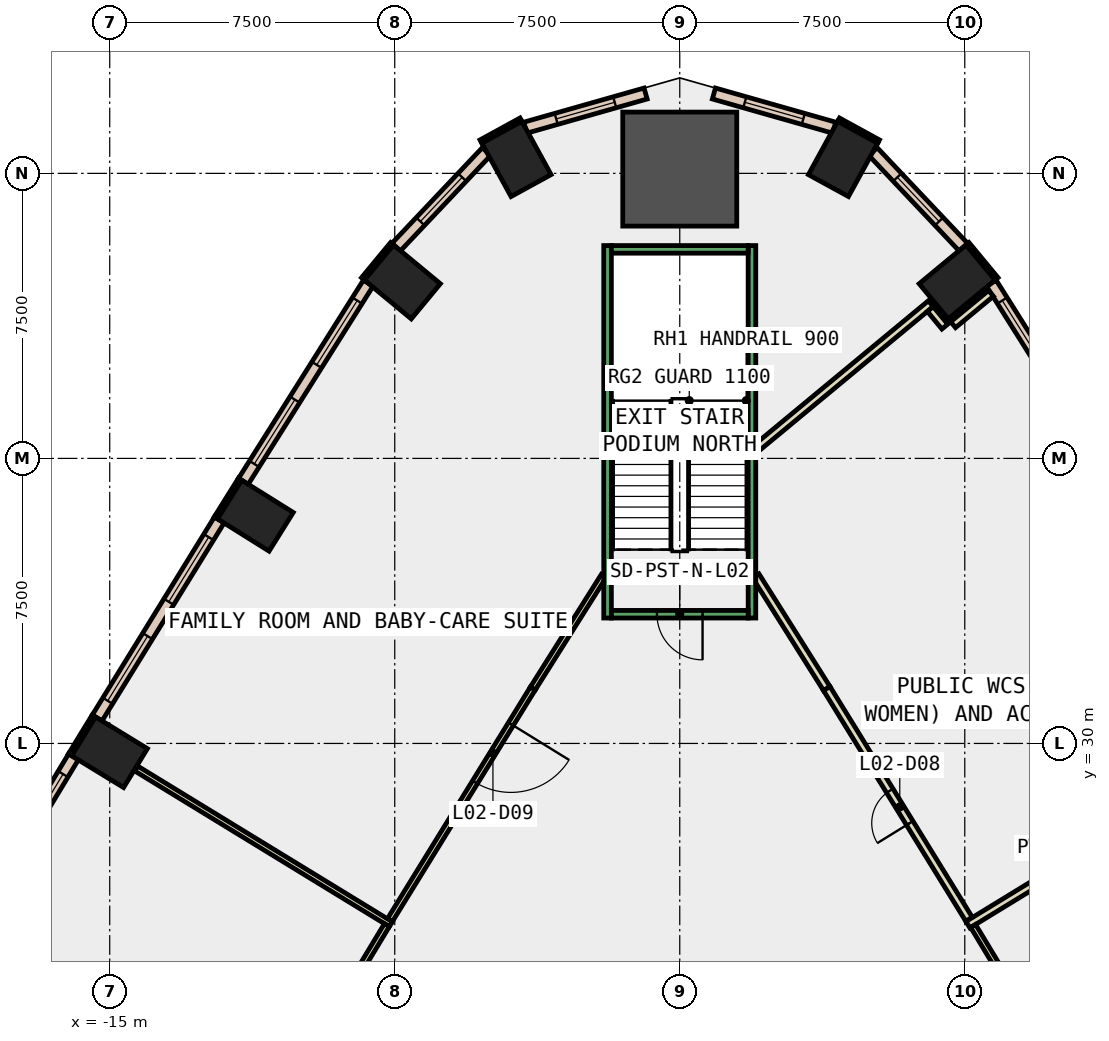
"""IFC4 building model, lengths in metres.
Left out: names, types, materials, properties, quantities, classifications, styles, units other than length and angle.
Written with IfcOpenShell. Run it as: python <this file> out.ifc"""

import sys

from ifc_helpers import new_model, si_unit, direction, frame, frame_2d, origin, origin_2d, place, context, subcontext, project, spatial, rectangle, extrude, element, fill, save


model = new_model("IFC4")
c1 = context("Model", 3, precision=1e-05, world=origin(), true_north=direction((0.0, 1.0)))
c2 = subcontext(c1, "Body", "Model", "MODEL_VIEW")
j1 = project(units=[si_unit("LENGTHUNIT", "METRE"), si_unit("PLANEANGLEUNIT", "RADIAN")], contexts=[c1])
p1 = place(None, origin())
s1 = spatial("IfcSite", under=j1, at=p1, CompositionType="ELEMENT")
p2 = place(p1, origin())
s2 = spatial("IfcBuilding", under=s1, at=p2, CompositionType="ELEMENT")
p3 = place(p2, frame((0.0, 0.0, 15.0)))
s3 = spatial("IfcBuildingStorey", under=s2, at=p3, CompositionType="ELEMENT", Elevation=15.0)
for number, where, z_axis, x_axis in (
    (1, (7.299, 42.144, -0.45), (0.0, 0.0, 1.0), (-0.638, 0.77, 0.0)),
    (2, (4.297, 45.38, -0.45), (0.0, 0.0, 1.0), (-0.877, 0.48, 0.0)),
):
    element("IfcColumn", number, at=place(p3, frame(where, z_axis=z_axis, x_axis=x_axis)), inside=s3, PredefinedType="COLUMN", context=c2, shape_type="SweptSolid", body=[
        extrude(rectangle(XDim=1.2, YDim=1.6, at=origin_2d()), origin(), (0.0, 0.0, 1.0), 5.0),
    ])
p4 = place(p3, frame((0.0, 45.112, -0.45), z_axis=(0.0, 0.0, 1.0), x_axis=(0.0, 1.0, 0.0)))
e3 = element("IfcColumn", 3, at=p4, inside=s3, PredefinedType="COLUMN", context=c2, shape_type="SweptSolid", body=[
    extrude(rectangle(XDim=3.0, YDim=3.0, at=origin_2d()), origin(), (0.0, 0.0, 1.0), 5.0),
])
for number, where, z_axis, x_axis in (
    (4, (-4.297, 45.38, -0.45), (0.0, 0.0, 1.0), (0.877, 0.48, 0.0)),
    (5, (-7.299, 42.144, -0.45), (0.0, 0.0, 1.0), (0.638, 0.77, 0.0)),
    (6, (-11.167, 35.993, -0.45), (0.0, 0.0, 1.0), (0.53, 0.848, 0.0)),
    (7, (-15.005, 29.769, -0.45), (0.0, 0.0, 1.0), (0.522, 0.853, 0.0)),
):
    element("IfcColumn", number, at=place(p3, frame(where, z_axis=z_axis, x_axis=x_axis)), inside=s3, PredefinedType="COLUMN", context=c2, shape_type="SweptSolid", body=[
        extrude(rectangle(XDim=1.2, YDim=1.6, at=origin_2d()), origin(), (0.0, 0.0, 1.0), 5.0),
    ])
for number, where, z_axis, x_axis in (
    (8, (5.231, 45.837, 0.0), (0.0, 0.0, 1.0), (-0.877, 0.48, 0.0)),
    (9, (-4.179, 46.413, 0.0), (0.0, 0.0, 1.0), (-0.877, -0.48, 0.0)),
    (10, (8.336, 42.224, 0.0), (0.0, 0.0, 1.0), (-0.638, 0.77, 0.0)),
    (11, (-7.571, 43.148, 0.0), (0.0, 0.0, 1.0), (-0.638, -0.77, 0.0)),
    (12, (-11.57, 36.952, 0.0), (0.0, 0.0, 1.0), (-0.53, -0.848, 0.0)),
):
    element("IfcWall", number, at=place(p3, frame(where, z_axis=z_axis, x_axis=x_axis)), inside=s3, PredefinedType="STANDARD", context=c2, shape_type="SweptSolid", body=[
        extrude(rectangle(XDim=1.199, YDim=0.1, at=frame_2d((0.6, 0.0))), origin(), (0.0, 0.0, 1.0), 4.55),
    ])
p5 = place(p3, frame((-15.417, 30.724, 0.0), z_axis=(0.0, 0.0, 1.0), x_axis=(-0.521507599072, -0.853246637327, 0.0)))
e13 = element("IfcWall", 13, at=p5, inside=s3, PredefinedType="STANDARD", context=c2, shape_type="SweptSolid", body=[
    extrude(rectangle(XDim=1.2, YDim=0.1, at=frame_2d((0.6, 0.0))), origin(), (0.0, 0.0, 1.0), 4.55),
])
p6 = place(p3, frame((11.483, 36.897, 0.0), z_axis=(0.0, 0.0, 1.0), x_axis=(-0.53304020879, 0.846089910006, 0.0)))
e14 = element("IfcWall", 14, at=p6, inside=s3, PredefinedType="STANDARD", context=c2, shape_type="SweptSolid", body=[
    extrude(rectangle(XDim=6.163, YDim=0.3, at=frame_2d((3.081, 0.0))), origin(), (0.0, 0.0, 1.0), 4.55),
])
p7 = place(p6, frame((0.541, 0.0, 1.0)))
e15 = element("IfcOpeningElement", 15, at=p7, cuts=e14, PredefinedType="OPENING", context=c2, shape_type="SweptSolid", body=[
    extrude(rectangle(XDim=2.0, YDim=3.2, at=frame_2d((1.0, 1.6))), frame((0.0, 0.16, 0.0), z_axis=(0.0, -1.0, 0.0), x_axis=(1.0, 0.0, 0.0)), (0.0, 0.0, 1.0), 0.32),
])
p8 = place(p6, frame((3.622, 0.0, 1.0)))
e16 = element("IfcOpeningElement", 16, at=p8, cuts=e14, PredefinedType="OPENING", context=c2, shape_type="SweptSolid", body=[
    extrude(rectangle(XDim=2.0, YDim=3.2, at=frame_2d((1.0, 1.6))), frame((0.0, 0.16, 0.0), z_axis=(0.0, -1.0, 0.0), x_axis=(1.0, 0.0, 0.0)), (0.0, 0.0, 1.0), 0.32),
])
p9 = place(p3, frame((7.464, 43.058, 0.0), z_axis=(0.0, 0.0, 1.0), x_axis=(-0.687081126245, 0.726580708495, 0.0)))
e17 = element("IfcWall", 17, at=p9, inside=s3, PredefinedType="STANDARD", context=c2, shape_type="SweptSolid", body=[
    extrude(rectangle(XDim=3.461, YDim=0.3, at=frame_2d((1.73, 0.0))), origin(), (0.0, 0.0, 1.0), 4.55),
])
p10 = place(p9, frame((0.931, 0.0, 1.0)))
e18 = element("IfcOpeningElement", 18, at=p10, cuts=e17, PredefinedType="OPENING", context=c2, shape_type="SweptSolid", body=[
    extrude(rectangle(XDim=1.6, YDim=3.2, at=frame_2d((0.8, 1.6))), frame((0.0, 0.16, 0.0), z_axis=(0.0, -1.0, 0.0), x_axis=(1.0, 0.0, 0.0)), (0.0, 0.0, 1.0), 0.32),
])
p11 = place(p3, frame((4.064, 46.202, 0.0), z_axis=(0.0, 0.0, 1.0), x_axis=(-0.961934470867, 0.273280211062, 0.0)))
e19 = element("IfcWall", 19, at=p11, inside=s3, PredefinedType="STANDARD", context=c2, shape_type="SweptSolid", body=[
    extrude(rectangle(XDim=3.29, YDim=0.3, at=frame_2d((1.645, 0.0))), origin(), (0.0, 0.0, 1.0), 4.55),
])
p12 = place(p11, frame((0.845, 0.0, 1.0)))
e20 = element("IfcOpeningElement", 20, at=p12, cuts=e19, PredefinedType="OPENING", context=c2, shape_type="SweptSolid", body=[
    extrude(rectangle(XDim=1.6, YDim=3.2, at=frame_2d((0.8, 1.6))), frame((0.0, 0.16, 0.0), z_axis=(0.0, -1.0, 0.0), x_axis=(1.0, 0.0, 0.0)), (0.0, 0.0, 1.0), 0.32),
])
p13 = place(p3, frame((-0.899, 47.101, 0.0), z_axis=(0.0, 0.0, 1.0), x_axis=(-0.961934470867, -0.273280211062, 0.0)))
e21 = element("IfcWall", 21, at=p13, inside=s3, PredefinedType="STANDARD", context=c2, shape_type="SweptSolid", body=[
    extrude(rectangle(XDim=3.29, YDim=0.3, at=frame_2d((1.645, 0.0))), origin(), (0.0, 0.0, 1.0), 4.55),
])
p14 = place(p13, frame((0.845, 0.0, 1.0)))
e22 = element("IfcOpeningElement", 22, at=p14, cuts=e21, PredefinedType="OPENING", context=c2, shape_type="SweptSolid", body=[
    extrude(rectangle(XDim=1.6, YDim=3.2, at=frame_2d((0.8, 1.6))), frame((0.0, 0.16, 0.0), z_axis=(0.0, -1.0, 0.0), x_axis=(1.0, 0.0, 0.0)), (0.0, 0.0, 1.0), 0.32),
])
p15 = place(p3, frame((-5.086, 45.573, 0.0), z_axis=(0.0, 0.0, 1.0), x_axis=(-0.687081126245, -0.726580708495, 0.0)))
e23 = element("IfcWall", 23, at=p15, inside=s3, PredefinedType="STANDARD", context=c2, shape_type="SweptSolid", body=[
    extrude(rectangle(XDim=3.461, YDim=0.3, at=frame_2d((1.73, 0.0))), origin(), (0.0, 0.0, 1.0), 4.55),
])
p16 = place(p15, frame((0.931, 0.0, 1.0)))
e24 = element("IfcOpeningElement", 24, at=p16, cuts=e23, PredefinedType="OPENING", context=c2, shape_type="SweptSolid", body=[
    extrude(rectangle(XDim=1.6, YDim=3.2, at=frame_2d((0.8, 1.6))), frame((0.0, 0.16, 0.0), z_axis=(0.0, -1.0, 0.0), x_axis=(1.0, 0.0, 0.0)), (0.0, 0.0, 1.0), 0.32),
])
p17 = place(p3, frame((-8.198, 42.111, 0.0), z_axis=(0.0, 0.0, 1.0), x_axis=(-0.53304020879, -0.846089910006, 0.0)))
e25 = element("IfcWall", 25, at=p17, inside=s3, PredefinedType="STANDARD", context=c2, shape_type="SweptSolid", body=[
    extrude(rectangle(XDim=6.163, YDim=0.3, at=frame_2d((3.081, 0.0))), origin(), (0.0, 0.0, 1.0), 4.55),
])
p18 = place(p17, frame((0.541, 0.0, 1.0)))
e26 = element("IfcOpeningElement", 26, at=p18, cuts=e25, PredefinedType="OPENING", context=c2, shape_type="SweptSolid", body=[
    extrude(rectangle(XDim=2.0, YDim=3.2, at=frame_2d((1.0, 1.6))), frame((0.0, 0.16, 0.0), z_axis=(0.0, -1.0, 0.0), x_axis=(1.0, 0.0, 0.0)), (0.0, 0.0, 1.0), 0.32),
])
p19 = place(p17, frame((3.622, 0.0, 1.0)))
e27 = element("IfcOpeningElement", 27, at=p19, cuts=e25, PredefinedType="OPENING", context=c2, shape_type="SweptSolid", body=[
    extrude(rectangle(XDim=2.0, YDim=3.2, at=frame_2d((1.0, 1.6))), frame((0.0, 0.16, 0.0), z_axis=(0.0, -1.0, 0.0), x_axis=(1.0, 0.0, 0.0)), (0.0, 0.0, 1.0), 0.32),
])
p20 = place(p3, frame((-12.117, 35.881, 0.0), z_axis=(0.0, 0.0, 1.0), x_axis=(-0.524953701886, -0.85113078365, 0.0)))
e28 = element("IfcWall", 28, at=p20, inside=s3, PredefinedType="STANDARD", context=c2, shape_type="SweptSolid", body=[
    extrude(rectangle(XDim=6.123, YDim=0.3, at=frame_2d((3.061, 0.0))), origin(), (0.0, 0.0, 1.0), 4.55),
])
p21 = place(p20, frame((0.531, 0.0, 1.0)))
e29 = element("IfcOpeningElement", 29, at=p21, cuts=e28, PredefinedType="OPENING", context=c2, shape_type="SweptSolid", body=[
    extrude(rectangle(XDim=2.0, YDim=3.2, at=frame_2d((1.0, 1.6))), frame((0.0, 0.16, 0.0), z_axis=(0.0, -1.0, 0.0), x_axis=(1.0, 0.0, 0.0)), (0.0, 0.0, 1.0), 0.32),
])
p22 = place(p20, frame((3.592, 0.0, 1.0)))
e30 = element("IfcOpeningElement", 30, at=p22, cuts=e28, PredefinedType="OPENING", context=c2, shape_type="SweptSolid", body=[
    extrude(rectangle(XDim=2.0, YDim=3.2, at=frame_2d((1.0, 1.6))), frame((0.0, 0.16, 0.0), z_axis=(0.0, -1.0, 0.0), x_axis=(1.0, 0.0, 0.0)), (0.0, 0.0, 1.0), 0.32),
])
p23 = place(p3, frame((-15.954, 29.647, 0.0), z_axis=(0.0, 0.0, 1.0), x_axis=(-0.516687651362, -0.85617397235, 0.0)))
e31 = element("IfcWall", 31, at=p23, inside=s3, PredefinedType="STANDARD", context=c2, shape_type="SweptSolid", body=[
    extrude(rectangle(XDim=6.121, YDim=0.3, at=frame_2d((3.061, 0.0))), origin(), (0.0, 0.0, 1.0), 4.55),
])
p24 = place(p23, frame((0.53, 0.0, 1.0)))
e32 = element("IfcOpeningElement", 32, at=p24, cuts=e31, PredefinedType="OPENING", context=c2, shape_type="SweptSolid", body=[
    extrude(rectangle(XDim=2.0, YDim=3.2, at=frame_2d((1.0, 1.6))), frame((0.0, 0.16, 0.0), z_axis=(0.0, -1.0, 0.0), x_axis=(1.0, 0.0, 0.0)), (0.0, 0.0, 1.0), 0.32),
])
p25 = place(p23, frame((3.591, 0.0, 1.0)))
e33 = element("IfcOpeningElement", 33, at=p25, cuts=e31, PredefinedType="OPENING", context=c2, shape_type="SweptSolid", body=[
    extrude(rectangle(XDim=2.0, YDim=3.2, at=frame_2d((1.0, 1.6))), frame((0.0, 0.16, 0.0), z_axis=(0.0, -1.0, 0.0), x_axis=(1.0, 0.0, 0.0)), (0.0, 0.0, 1.0), 0.32),
])
p26 = place(p3, frame((7.583, 25.231, 0.0), z_axis=(0.0, 0.0, 1.0), x_axis=(0.853185410435, 0.521607760124, 0.0)))
e34 = element("IfcWall", 34, at=p26, inside=s3, PredefinedType="PARTITIONING", context=c2, shape_type="SweptSolid", body=[
    extrude(rectangle(XDim=7.699, YDim=0.2, at=frame_2d((3.85, 0.0))), origin(), (0.0, 0.0, 1.0), 4.55),
])
p27 = place(p3, frame((11.397, 19.101, 0.0), z_axis=(0.0, 0.0, 1.0), x_axis=(-0.516501552057, 0.856286252793, 0.0)))
e35 = element("IfcWall", 35, at=p27, inside=s3, PredefinedType="PARTITIONING", context=c2, shape_type="SweptSolid", body=[
    extrude(rectangle(XDim=7.119, YDim=0.15, at=frame_2d((3.56, 0.0))), origin(), (0.0, 0.0, 1.0), 4.55),
])
p28 = place(p27, frame((0.1, 0.0, 0.0)))
e36 = element("IfcOpeningElement", 36, at=p28, cuts=e35, PredefinedType="OPENING", context=c2, shape_type="SweptSolid", body=[
    extrude(rectangle(XDim=1.8, YDim=2.1, at=frame_2d((0.9, 1.05))), frame((0.0, 0.085, 0.0), z_axis=(0.0, -1.0, 0.0), x_axis=(1.0, 0.0, 0.0)), (0.0, 0.0, 1.0), 0.17),
])
p29 = place(p3, frame((2.0, 37.758, 0.0), z_axis=(0.0, 0.0, 1.0), x_axis=(0.7702988792, 0.637683022122, 0.0)))
e37 = element("IfcWall", 37, at=p29, inside=s3, PredefinedType="PARTITIONING", context=c2, shape_type="SweptSolid", body=[
    extrude(rectangle(XDim=5.979, YDim=0.2, at=frame_2d((2.99, 0.0))), origin(), (0.0, 0.0, 1.0), 4.55),
])
p30 = place(p3, frame((6.593, 41.43, 0.0), z_axis=(0.0, 0.0, 1.0), x_axis=(0.636576557089, -0.771213515808, 0.0)))
e38 = element("IfcWall", 38, at=p30, inside=s3, PredefinedType="PARTITIONING", context=c2, shape_type="SweptSolid", body=[
    extrude(rectangle(XDim=0.6, YDim=0.2, at=frame_2d((0.3, 0.0))), origin(), (0.0, 0.0, 1.0), 4.55),
])
p31 = place(p3, frame((7.193, 41.018, 0.0), z_axis=(0.0, 0.0, 1.0), x_axis=(0.77046149962, 0.637486531311, 0.0)))
e39 = element("IfcWall", 39, at=p31, inside=s3, PredefinedType="PARTITIONING", context=c2, shape_type="SweptSolid", body=[
    extrude(rectangle(XDim=1.292, YDim=0.2, at=frame_2d((0.646, 0.0))), origin(), (0.0, 0.0, 1.0), 4.55),
])
p32 = place(p3, frame((3.868, 31.444, 0.0), z_axis=(0.0, 0.0, 1.0), x_axis=(-0.533177332948, 0.846003505684, 0.0)))
e40 = element("IfcWall", 40, at=p32, inside=s3, PredefinedType="PARTITIONING", context=c2, shape_type="SweptSolid", body=[
    extrude(rectangle(XDim=3.503, YDim=0.2, at=frame_2d((1.752, 0.0))), origin(), (0.0, 0.0, 1.0), 4.55),
])
p33 = place(p3, frame((7.611, 25.376, 0.0), z_axis=(0.0, 0.0, 1.0), x_axis=(-0.525006538042, 0.85109819352, 0.0)))
e41 = element("IfcWall", 41, at=p33, inside=s3, PredefinedType="PARTITIONING", context=c2, shape_type="SweptSolid", body=[
    extrude(rectangle(XDim=7.13, YDim=0.2, at=frame_2d((3.565, 0.0))), origin(), (0.0, 0.0, 1.0), 4.55),
])
p34 = place(p33, frame((2.97, 0.0, 0.0)))
e42 = element("IfcOpeningElement", 42, at=p34, cuts=e41, PredefinedType="OPENING", context=c2, shape_type="SweptSolid", body=[
    extrude(rectangle(XDim=1.0, YDim=2.1, at=frame_2d((0.5, 1.05))), frame((0.0, 0.11, 0.0), z_axis=(0.0, -1.0, 0.0), x_axis=(1.0, 0.0, 0.0)), (0.0, 0.0, 1.0), 0.22),
])
p35 = place(p3, frame((-7.604, 25.244, 0.0), z_axis=(0.0, 0.0, 1.0), x_axis=(-0.853159640052, 0.521649909985, 0.0)))
e43 = element("IfcWall", 43, at=p35, inside=s3, PredefinedType="PARTITIONING", context=c2, shape_type="SweptSolid", body=[
    extrude(rectangle(XDim=7.854, YDim=0.15, at=frame_2d((3.927, 0.0))), origin(), (0.0, 0.0, 1.0), 4.55),
])
p36 = place(p3, frame((-2.0, 34.408, 0.0), z_axis=(0.0, 0.0, 1.0), x_axis=(-0.533177332948, -0.846003505684, 0.0)))
e44 = element("IfcWall", 44, at=p36, inside=s3, PredefinedType="PARTITIONING", context=c2, shape_type="SweptSolid", body=[
    extrude(rectangle(XDim=3.503, YDim=0.15, at=frame_2d((1.752, 0.0))), origin(), (0.0, 0.0, 1.0), 4.55),
])
p37 = place(p3, frame((-3.868, 31.444, 0.0), z_axis=(0.0, 0.0, 1.0), x_axis=(-0.525005307826, -0.851098952387, 0.0)))
e45 = element("IfcWall", 45, at=p37, inside=s3, PredefinedType="PARTITIONING", context=c2, shape_type="SweptSolid", body=[
    extrude(rectangle(XDim=7.154, YDim=0.15, at=frame_2d((3.577, 0.0))), origin(), (0.0, 0.0, 1.0), 4.55),
])
p38 = place(p37, frame((1.096, 0.0, 0.0)))
e46 = element("IfcOpeningElement", 46, at=p38, cuts=e45, PredefinedType="OPENING", context=c2, shape_type="SweptSolid", body=[
    extrude(rectangle(XDim=1.8, YDim=2.1, at=frame_2d((0.9, 1.05))), frame((0.0, 0.085, 0.0), z_axis=(0.0, -1.0, 0.0), x_axis=(1.0, 0.0, 0.0)), (0.0, 0.0, 1.0), 0.17),
])
p39 = place(p3, frame((-7.707, 25.219, 0.0), z_axis=(0.0, 0.0, 1.0), x_axis=(-0.516469307375, -0.856305701569, 0.0)))
e47 = element("IfcWall", 47, at=p39, inside=s3, PredefinedType="PARTITIONING", context=c2, shape_type="SweptSolid", body=[
    extrude(rectangle(XDim=7.145, YDim=0.15, at=frame_2d((3.572, 0.0))), origin(), (0.0, 0.0, 1.0), 4.55),
])
for number, where, z_axis, x_axis in (
    (48, (1.9, 33.3, 0.0), (0.0, 0.0, 1.0), (0.0, 1.0, 0.0)),
    (49, (-1.9, 33.3, 0.0), (0.0, 0.0, 1.0), (0.0, 1.0, 0.0)),
):
    element("IfcWall", number, at=place(p3, frame(where, z_axis=z_axis, x_axis=x_axis)), inside=s3, PredefinedType="STANDARD", context=c2, shape_type="SweptSolid", body=[
        extrude(rectangle(XDim=9.8, YDim=0.2, at=frame_2d((4.9, 0.0))), origin(), (0.0, 0.0, 1.0), 4.55),
    ])
p40 = place(p3, frame((1.8, 33.4, 0.0), z_axis=(0.0, 0.0, 1.0), x_axis=(-1.0, 0.0, 0.0)))
e50 = element("IfcWall", 50, at=p40, inside=s3, PredefinedType="STANDARD", context=c2, shape_type="SweptSolid", body=[
    extrude(rectangle(XDim=3.6, YDim=0.2, at=frame_2d((1.8, 0.0))), origin(), (0.0, 0.0, 1.0), 4.55),
])
p41 = place(p40, frame((1.2, 0.0, 0.0)))
e51 = element("IfcOpeningElement", 51, at=p41, cuts=e50, PredefinedType="OPENING", context=c2, shape_type="SweptSolid", body=[
    extrude(rectangle(XDim=1.2, YDim=2.2, at=frame_2d((0.6, 1.1))), frame((0.0, 0.11, 0.0), z_axis=(0.0, -1.0, 0.0), x_axis=(1.0, 0.0, 0.0)), (0.0, 0.0, 1.0), 0.22),
])
p42 = place(p3, frame((1.8, 43.0, 0.0), z_axis=(0.0, 0.0, 1.0), x_axis=(-1.0, 0.0, 0.0)))
e52 = element("IfcWall", 52, at=p42, inside=s3, PredefinedType="STANDARD", context=c2, shape_type="SweptSolid", body=[
    extrude(rectangle(XDim=3.6, YDim=0.2, at=frame_2d((1.8, 0.0))), origin(), (0.0, 0.0, 1.0), 4.55),
])
p43 = place(p8, origin())
e53 = element("IfcWindow", 53, at=p43, inside=s3, PartitioningType="SINGLE_PANEL", PredefinedType="WINDOW", context=c2, shape_type="SweptSolid", body=[
    extrude(rectangle(XDim=2.0, YDim=3.2, at=frame_2d((1.0, 1.6))), frame((0.0, 0.03, 0.0), z_axis=(0.0, -1.0, 0.0), x_axis=(1.0, 0.0, 0.0)), (0.0, 0.0, 1.0), 0.06),
])
fill(e16, e53)
p44 = place(p10, origin())
e54 = element("IfcWindow", 54, at=p44, inside=s3, PartitioningType="SINGLE_PANEL", PredefinedType="WINDOW", context=c2, shape_type="SweptSolid", body=[
    extrude(rectangle(XDim=1.6, YDim=3.2, at=frame_2d((0.8, 1.6))), frame((0.0, 0.03, 0.0), z_axis=(0.0, -1.0, 0.0), x_axis=(1.0, 0.0, 0.0)), (0.0, 0.0, 1.0), 0.06),
])
fill(e18, e54)
p45 = place(p12, origin())
e55 = element("IfcWindow", 55, at=p45, inside=s3, PartitioningType="SINGLE_PANEL", PredefinedType="WINDOW", context=c2, shape_type="SweptSolid", body=[
    extrude(rectangle(XDim=1.6, YDim=3.2, at=frame_2d((0.8, 1.6))), frame((0.0, 0.03, 0.0), z_axis=(0.0, -1.0, 0.0), x_axis=(1.0, 0.0, 0.0)), (0.0, 0.0, 1.0), 0.06),
])
fill(e20, e55)
p46 = place(p14, origin())
e56 = element("IfcWindow", 56, at=p46, inside=s3, PartitioningType="SINGLE_PANEL", PredefinedType="WINDOW", context=c2, shape_type="SweptSolid", body=[
    extrude(rectangle(XDim=1.6, YDim=3.2, at=frame_2d((0.8, 1.6))), frame((0.0, 0.03, 0.0), z_axis=(0.0, -1.0, 0.0), x_axis=(1.0, 0.0, 0.0)), (0.0, 0.0, 1.0), 0.06),
])
fill(e22, e56)
p47 = place(p16, origin())
e57 = element("IfcWindow", 57, at=p47, inside=s3, PartitioningType="SINGLE_PANEL", PredefinedType="WINDOW", context=c2, shape_type="SweptSolid", body=[
    extrude(rectangle(XDim=1.6, YDim=3.2, at=frame_2d((0.8, 1.6))), frame((0.0, 0.03, 0.0), z_axis=(0.0, -1.0, 0.0), x_axis=(1.0, 0.0, 0.0)), (0.0, 0.0, 1.0), 0.06),
])
fill(e24, e57)
p48 = place(p18, origin())
e58 = element("IfcWindow", 58, at=p48, inside=s3, PartitioningType="SINGLE_PANEL", PredefinedType="WINDOW", context=c2, shape_type="SweptSolid", body=[
    extrude(rectangle(XDim=2.0, YDim=3.2, at=frame_2d((1.0, 1.6))), frame((0.0, 0.03, 0.0), z_axis=(0.0, -1.0, 0.0), x_axis=(1.0, 0.0, 0.0)), (0.0, 0.0, 1.0), 0.06),
])
fill(e26, e58)
p49 = place(p19, origin())
e59 = element("IfcWindow", 59, at=p49, inside=s3, PartitioningType="SINGLE_PANEL", PredefinedType="WINDOW", context=c2, shape_type="SweptSolid", body=[
    extrude(rectangle(XDim=2.0, YDim=3.2, at=frame_2d((1.0, 1.6))), frame((0.0, 0.03, 0.0), z_axis=(0.0, -1.0, 0.0), x_axis=(1.0, 0.0, 0.0)), (0.0, 0.0, 1.0), 0.06),
])
fill(e27, e59)
p50 = place(p21, origin())
e60 = element("IfcWindow", 60, at=p50, inside=s3, PartitioningType="SINGLE_PANEL", PredefinedType="WINDOW", context=c2, shape_type="SweptSolid", body=[
    extrude(rectangle(XDim=2.0, YDim=3.2, at=frame_2d((1.0, 1.6))), frame((0.0, 0.03, 0.0), z_axis=(0.0, -1.0, 0.0), x_axis=(1.0, 0.0, 0.0)), (0.0, 0.0, 1.0), 0.06),
])
fill(e29, e60)
p51 = place(p22, origin())
e61 = element("IfcWindow", 61, at=p51, inside=s3, PartitioningType="SINGLE_PANEL", PredefinedType="WINDOW", context=c2, shape_type="SweptSolid", body=[
    extrude(rectangle(XDim=2.0, YDim=3.2, at=frame_2d((1.0, 1.6))), frame((0.0, 0.03, 0.0), z_axis=(0.0, -1.0, 0.0), x_axis=(1.0, 0.0, 0.0)), (0.0, 0.0, 1.0), 0.06),
])
fill(e30, e61)
p52 = place(p24, origin())
e62 = element("IfcWindow", 62, at=p52, inside=s3, PartitioningType="SINGLE_PANEL", PredefinedType="WINDOW", context=c2, shape_type="SweptSolid", body=[
    extrude(rectangle(XDim=2.0, YDim=3.2, at=frame_2d((1.0, 1.6))), frame((0.0, 0.03, 0.0), z_axis=(0.0, -1.0, 0.0), x_axis=(1.0, 0.0, 0.0)), (0.0, 0.0, 1.0), 0.06),
])
fill(e32, e62)
p53 = place(p34, origin())
e63 = element("IfcDoor", 63, at=p53, inside=s3, OperationType="SINGLE_SWING_LEFT", PredefinedType="DOOR", context=c2, shape_type="SweptSolid", body=[
    extrude(rectangle(XDim=1.0, YDim=2.1, at=frame_2d((0.5, 1.05))), frame((0.0, 0.025, 0.0), z_axis=(0.0, -1.0, 0.0), x_axis=(1.0, 0.0, 0.0)), (0.0, 0.0, 1.0), 0.05),
])
fill(e42, e63)
p54 = place(p38, origin())
e64 = element("IfcDoor", 64, at=p54, inside=s3, OperationType="DOUBLE_DOOR_SINGLE_SWING", PredefinedType="DOOR", context=c2, shape_type="SweptSolid", body=[
    extrude(rectangle(XDim=1.8, YDim=2.1, at=frame_2d((0.9, 1.05))), frame((0.0, 0.025, 0.0), z_axis=(0.0, -1.0, 0.0), x_axis=(1.0, 0.0, 0.0)), (0.0, 0.0, 1.0), 0.05),
])
fill(e46, e64)
p55 = place(p41, origin())
e65 = element("IfcDoor", 65, at=p55, inside=s3, OperationType="SINGLE_SWING_LEFT", PredefinedType="DOOR", context=c2, shape_type="SweptSolid", body=[
    extrude(rectangle(XDim=1.2, YDim=2.2, at=frame_2d((0.6, 1.1))), frame((0.0, 0.025, 0.0), z_axis=(0.0, -1.0, 0.0), x_axis=(1.0, 0.0, 0.0)), (0.0, 0.0, 1.0), 0.05),
])
fill(e51, e65)
save(model, sys.argv[1])
